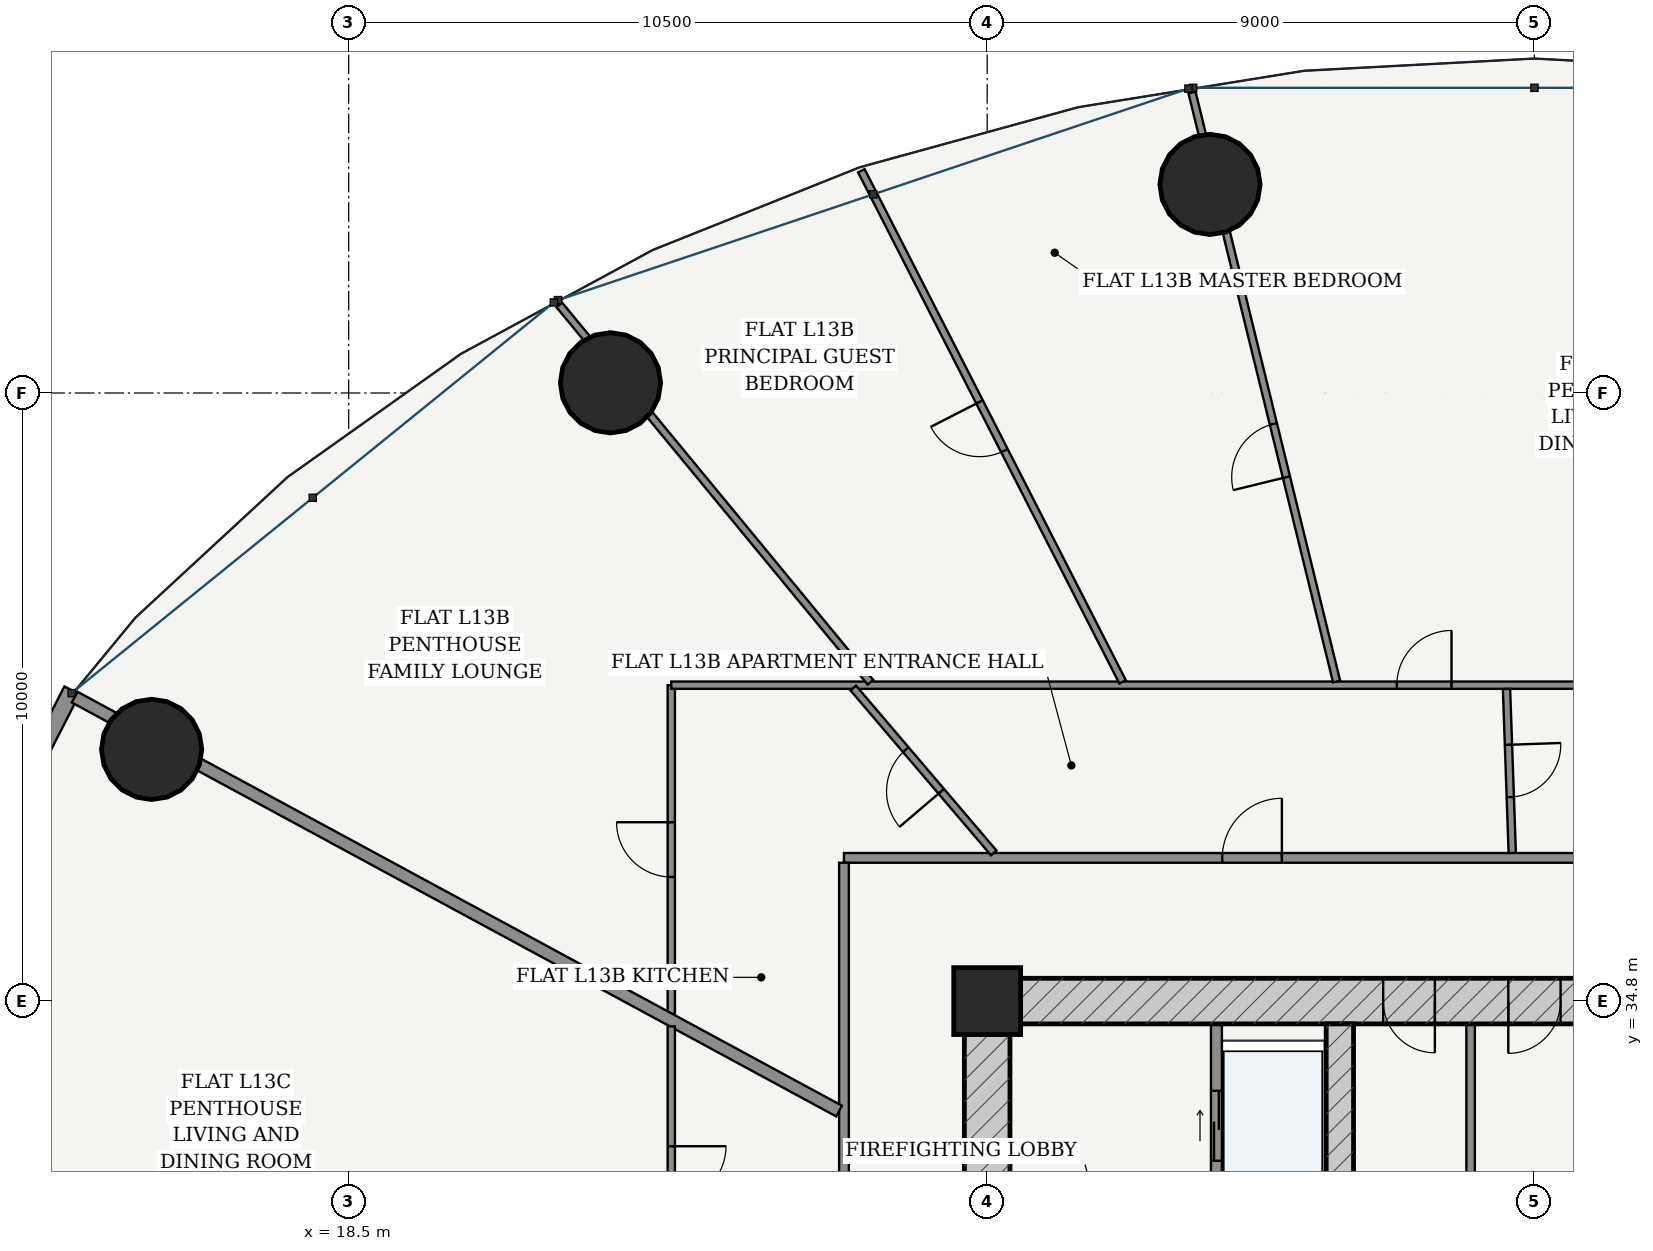
"""IFC4 building model, lengths in metres.
Left out: names, types, materials, properties, quantities, classifications, styles, units other than length and angle.
Written with IfcOpenShell. Run it as: python <this file> out.ifc"""

import sys

from ifc_helpers import new_model, si_unit, direction, frame, frame_2d, origin, origin_2d, place, context, subcontext, project, spatial, rectangle, hollow_circle, extrude, source, transform, mapped, element, fill, save


model = new_model("IFC4")
c1 = context("Model", 3, precision=1e-05, world=origin(), true_north=direction((-0.2419218956, 0.970295726276)))
c2 = subcontext(c1, "Body", "Model", "MODEL_VIEW")
j1 = project(units=[si_unit("LENGTHUNIT", "METRE"), si_unit("PLANEANGLEUNIT", "RADIAN")], contexts=[c1])
p1 = place(None, origin())
s1 = spatial("IfcSite", under=j1, at=p1, CompositionType="ELEMENT")
p2 = place(p1, origin())
s2 = spatial("IfcBuilding", under=s1, at=p2, CompositionType="ELEMENT")
p3 = place(p2, frame((0.0, 0.0, 52.8)))
s3 = spatial("IfcBuildingStorey", under=s2, at=p3, CompositionType="ELEMENT", Elevation=52.8)
p4 = place(p3, frame((29.0, 34.8, 0.0), z_axis=(0.0, 0.0, 1.0), x_axis=(1.0, 0.0, 0.0)))
e1 = element("IfcColumn", 1, at=p4, inside=s3, PredefinedType="COLUMN", context=c2, shape_type="SweptSolid", body=[
    extrude(rectangle(XDim=1.1, YDim=1.1, at=origin_2d()), origin(), (0.0, 0.0, 1.0), 3.6),
])
p5 = place(p3, frame((28.625, 34.8, 0.0), z_axis=(0.0, 0.0, 1.0), x_axis=(1.0, 0.0, 0.0)))
e2 = element("IfcWall", 2, at=p5, inside=s3, PredefinedType="SHEAR", context=c2, shape_type="SweptSolid", body=[
    extrude(rectangle(XDim=18.75, YDim=0.75, at=frame_2d((9.375, 0.0))), origin(), (0.0, 0.0, 1.0), 3.32),
])
p6 = place(p5, frame((6.887, 0.0, 0.0)))
e3 = element("IfcOpeningElement", 3, at=p6, cuts=e2, PredefinedType="OPENING", context=c2, shape_type="SweptSolid", body=[
    extrude(rectangle(XDim=0.85, YDim=2.1, at=frame_2d((0.425, 1.05))), frame((0.0, 0.385, 0.0), z_axis=(0.0, -1.0, 0.0), x_axis=(1.0, 0.0, 0.0)), (0.0, 0.0, 1.0), 0.77),
])
p7 = place(p5, frame((8.945, 0.0, 0.0)))
e4 = element("IfcOpeningElement", 4, at=p7, cuts=e2, PredefinedType="OPENING", context=c2, shape_type="SweptSolid", body=[
    extrude(rectangle(XDim=0.86, YDim=2.1, at=frame_2d((0.43, 1.05))), frame((0.0, 0.385, 0.0), z_axis=(0.0, -1.0, 0.0), x_axis=(1.0, 0.0, 0.0)), (0.0, 0.0, 1.0), 0.77),
])
p8 = place(p5, frame((11.012, 0.0, 0.0)))
e5 = element("IfcOpeningElement", 5, at=p8, cuts=e2, PredefinedType="OPENING", context=c2, shape_type="SweptSolid", body=[
    extrude(rectangle(XDim=0.85, YDim=2.1, at=frame_2d((0.425, 1.05))), frame((0.0, 0.385, 0.0), z_axis=(0.0, -1.0, 0.0), x_axis=(1.0, 0.0, 0.0)), (0.0, 0.0, 1.0), 0.77),
])
p9 = place(p3, frame((29.0, 19.175, 0.0), z_axis=(0.0, 0.0, 1.0), x_axis=(0.0, 1.0, 0.0)))
e6 = element("IfcWall", 6, at=p9, inside=s3, PredefinedType="SHEAR", context=c2, shape_type="SweptSolid", body=[
    extrude(rectangle(XDim=15.25, YDim=0.75, at=frame_2d((7.625, 0.0))), origin(), (0.0, 0.0, 1.0), 3.32),
])
p10 = place(p9, frame((9.875, 0.0, 0.0)))
e7 = element("IfcOpeningElement", 7, at=p10, cuts=e6, PredefinedType="OPENING", context=c2, shape_type="SweptSolid", body=[
    extrude(rectangle(XDim=1.5, YDim=2.2, at=frame_2d((0.75, 1.1))), frame((0.0, 0.385, 0.0), z_axis=(0.0, -1.0, 0.0), x_axis=(1.0, 0.0, 0.0)), (0.0, 0.0, 1.0), 0.77),
])
p11 = place(p3, frame((34.8, 19.175, 0.0), z_axis=(0.0, 0.0, 1.0), x_axis=(0.0, 1.0, 0.0)))
e8 = element("IfcWall", 8, at=p11, inside=s3, PredefinedType="SHEAR", context=c2, shape_type="SweptSolid", body=[
    extrude(rectangle(XDim=15.25, YDim=0.45, at=frame_2d((7.625, 0.0))), origin(), (0.0, 0.0, 1.0), 3.32),
])
p12 = place(p11, frame((7.8, 0.0, 0.0)))
e9 = element("IfcOpeningElement", 9, at=p12, cuts=e8, PredefinedType="OPENING", context=c2, shape_type="SweptSolid", body=[
    extrude(rectangle(XDim=1.05, YDim=2.15, at=frame_2d((0.525, 1.075))), frame((0.0, 0.235, 0.0), z_axis=(0.0, -1.0, 0.0), x_axis=(1.0, 0.0, 0.0)), (0.0, 0.0, 1.0), 0.47),
])
for number, where, z_axis, x_axis in (
    (10, (32.664, 48.23, 0.0), (0.0, 0.0, 1.0), (1.0, 0.0, 0.0)),
    (11, (22.805, 44.968, 0.0), (0.0, 0.0, 1.0), (1.0, 0.0, 0.0)),
    (12, (15.259, 38.939, 0.0), (0.0, 0.0, 1.0), (1.0, 0.0, 0.0)),
):
    element("IfcColumn", number, at=place(p3, frame(where, z_axis=z_axis, x_axis=x_axis)), inside=s3, PredefinedType="COLUMN", context=c2, shape_type="SweptSolid", body=[
        extrude(hollow_circle(Radius=0.825, WallThickness=0.05, at=origin_2d()), origin(), (0.0, 0.0, 1.0), 3.6),
    ])
p13 = place(p3, frame((13.949, 39.91, 0.0), z_axis=(0.0, 0.0, 1.0), x_axis=(-0.45523081716, -0.890373462715, 0.0)))
e13 = element("IfcWall", 13, at=p13, inside=s3, PredefinedType="SOLIDWALL", context=c2, shape_type="SweptSolid", body=[
    extrude(rectangle(XDim=9.662, YDim=0.28, at=frame_2d((4.831, 0.0))), origin(), (0.0, 0.0, 1.0), 3.32),
])
p14 = place(p13, frame((1.559, 0.0, 0.85)))
e14 = element("IfcOpeningElement", 14, at=p14, cuts=e13, PredefinedType="OPENING", context=c2, shape_type="SweptSolid", body=[
    extrude(rectangle(XDim=2.1, YDim=1.95, at=frame_2d((1.05, 0.975))), frame((0.0, 0.15, 0.0), z_axis=(0.0, -1.0, 0.0), x_axis=(1.0, 0.0, 0.0)), (0.0, 0.0, 1.0), 0.3),
])
p15 = place(p13, frame((6.003, 0.0, 0.85)))
e15 = element("IfcOpeningElement", 15, at=p15, cuts=e13, PredefinedType="OPENING", context=c2, shape_type="SweptSolid", body=[
    extrude(rectangle(XDim=2.1, YDim=1.95, at=frame_2d((1.05, 0.975))), frame((0.0, 0.15, 0.0), z_axis=(0.0, -1.0, 0.0), x_axis=(1.0, 0.0, 0.0)), (0.0, 0.0, 1.0), 0.3),
])
p16 = place(p3, frame((32.77, 28.52, 0.0), z_axis=(0.0, 0.0, 1.0), x_axis=(0.0, 1.0, 0.0)))
e16 = element("IfcWall", 16, at=p16, inside=s3, PredefinedType="PARTITIONING", context=c2, shape_type="SweptSolid", body=[
    extrude(rectangle(XDim=5.905, YDim=0.18, at=frame_2d((2.953, 0.0))), origin(), (0.0, 0.0, 1.0), 3.32),
])
p17 = place(p16, frame((3.655, 0.0, 0.0)))
e17 = element("IfcOpeningElement", 17, at=p17, cuts=e16, PredefinedType="OPENING", context=c2, shape_type="SweptSolid", body=[
    extrude(rectangle(XDim=1.15, YDim=2.2, at=frame_2d((0.575, 1.1))), frame((0.0, 0.1, 0.0), z_axis=(0.0, -1.0, 0.0), x_axis=(1.0, 0.0, 0.0)), (0.0, 0.0, 1.0), 0.2),
])
p18 = place(p16, frame((0.73, 0.0, 0.0)))
e18 = element("IfcOpeningElement", 18, at=p18, cuts=e16, PredefinedType="OPENING", context=c2, shape_type="SweptSolid", body=[
    extrude(rectangle(XDim=1.2, YDim=2.25, at=frame_2d((0.6, 1.125))), frame((0.0, 0.1, 0.0), z_axis=(0.0, -1.0, 0.0), x_axis=(1.0, 0.0, 0.0)), (0.0, 0.0, 1.0), 0.2),
])
p19 = place(p3, frame((36.95, 31.2, 0.0), z_axis=(0.0, 0.0, 1.0), x_axis=(0.0, 1.0, 0.0)))
e19 = element("IfcWall", 19, at=p19, inside=s3, PredefinedType="PARTITIONING", context=c2, shape_type="SweptSolid", body=[
    extrude(rectangle(XDim=3.225, YDim=0.14, at=frame_2d((1.613, 0.0))), origin(), (0.0, 0.0, 1.0), 3.32),
])
p20 = place(p3, frame((26.645, 37.155, 0.0), z_axis=(0.0, 0.0, 1.0), x_axis=(1.0, 0.0, 0.0)))
e20 = element("IfcWall", 20, at=p20, inside=s3, PredefinedType="PARTITIONING", context=c2, shape_type="SweptSolid", body=[
    extrude(rectangle(XDim=22.71, YDim=0.16, at=frame_2d((11.355, 0.0))), origin(), (0.0, 0.0, 1.0), 2.688),
])
p21 = place(p20, frame((19.075, 0.0, 0.0)))
e21 = element("IfcOpeningElement", 21, at=p21, cuts=e20, PredefinedType="OPENING", context=c2, shape_type="SweptSolid", body=[
    extrude(rectangle(XDim=0.98, YDim=2.2, at=frame_2d((0.49, 1.1))), frame((0.0, 0.09, 0.0), z_axis=(0.0, -1.0, 0.0), x_axis=(1.0, 0.0, 0.0)), (0.0, 0.0, 1.0), 0.18),
])
p22 = place(p20, frame((6.221, 0.0, 0.0)))
e22 = element("IfcOpeningElement", 22, at=p22, cuts=e20, PredefinedType="OPENING", context=c2, shape_type="SweptSolid", body=[
    extrude(rectangle(XDim=0.98, YDim=2.2, at=frame_2d((0.49, 1.1))), frame((0.0, 0.09, 0.0), z_axis=(0.0, -1.0, 0.0), x_axis=(1.0, 0.0, 0.0)), (0.0, 0.0, 1.0), 0.18),
])
p23 = place(p3, frame((26.645, 16.525, 0.0), z_axis=(0.0, 0.0, 1.0), x_axis=(0.0, 1.0, 0.0)))
e23 = element("IfcWall", 23, at=p23, inside=s3, PredefinedType="PARTITIONING", context=c2, shape_type="SweptSolid", body=[
    extrude(rectangle(XDim=20.55, YDim=0.16, at=frame_2d((10.275, 0.0))), origin(), (0.0, 0.0, 1.0), 2.688),
])
p24 = place(p23, frame((2.224, 0.0, 0.0)))
e24 = element("IfcOpeningElement", 24, at=p24, cuts=e23, PredefinedType="OPENING", context=c2, shape_type="SweptSolid", body=[
    extrude(rectangle(XDim=0.98, YDim=2.2, at=frame_2d((0.49, 1.1))), frame((0.0, 0.09, 0.0), z_axis=(0.0, -1.0, 0.0), x_axis=(1.0, 0.0, 0.0)), (0.0, 0.0, 1.0), 0.18),
])
p25 = place(p3, frame((23.805, 34.588, 0.0), z_axis=(0.0, 0.0, 1.0), x_axis=(0.0, 1.0, 0.0)))
e25 = element("IfcWall", 25, at=p25, inside=s3, PredefinedType="PARTITIONING", context=c2, shape_type="SweptSolid", body=[
    extrude(rectangle(XDim=5.407, YDim=0.12, at=frame_2d((2.704, 0.0))), origin(), (0.0, 0.0, 1.0), 2.999),
])
p26 = place(p25, frame((2.253, 0.0, 0.0)))
e26 = element("IfcOpeningElement", 26, at=p26, cuts=e25, PredefinedType="OPENING", context=c2, shape_type="SweptSolid", body=[
    extrude(rectangle(XDim=0.9, YDim=2.15, at=frame_2d((0.45, 1.075))), frame((0.0, 0.07, 0.0), z_axis=(0.0, -1.0, 0.0), x_axis=(1.0, 0.0, 0.0)), (0.0, 0.0, 1.0), 0.14),
])
p27 = place(p3, frame((23.805, 39.995, 0.0), z_axis=(0.0, 0.0, 1.0), x_axis=(1.0, 0.0, 0.0)))
e27 = element("IfcWall", 27, at=p27, inside=s3, PredefinedType="PARTITIONING", context=c2, shape_type="SweptSolid", body=[
    extrude(rectangle(XDim=20.838, YDim=0.12, at=frame_2d((10.419, 0.0))), origin(), (0.0, 0.0, 1.0), 2.688),
])
p28 = place(p27, frame((11.931, 0.0, 0.0)))
e28 = element("IfcOpeningElement", 28, at=p28, cuts=e27, PredefinedType="OPENING", context=c2, shape_type="SweptSolid", body=[
    extrude(rectangle(XDim=0.9, YDim=2.15, at=frame_2d((0.45, 1.075))), frame((0.0, 0.07, 0.0), z_axis=(0.0, -1.0, 0.0), x_axis=(1.0, 0.0, 0.0)), (0.0, 0.0, 1.0), 0.14),
])
p29 = place(p3, frame((34.746, 40.055, 0.0), z_axis=(0.0, 0.0, 1.0), x_axis=(-0.238386209483, 0.971170435675, 0.0)))
e29 = element("IfcWall", 29, at=p29, inside=s3, PredefinedType="PARTITIONING", context=c2, shape_type="SweptSolid", body=[
    extrude(rectangle(XDim=9.973, YDim=0.12, at=frame_2d((4.987, 0.0))), origin(), (0.0, 0.0, 1.0), 2.688),
])
p30 = place(p29, frame((3.461, 0.0, 0.0)))
e30 = element("IfcOpeningElement", 30, at=p30, cuts=e29, PredefinedType="OPENING", context=c2, shape_type="SweptSolid", body=[
    extrude(rectangle(XDim=0.9, YDim=2.15, at=frame_2d((0.45, 1.075))), frame((0.0, 0.07, 0.0), z_axis=(0.0, -1.0, 0.0), x_axis=(1.0, 0.0, 0.0)), (0.0, 0.0, 1.0), 0.14),
])
p31 = place(p3, frame((31.227, 40.05, 0.0), z_axis=(0.0, 0.0, 1.0), x_axis=(-0.455142050367, 0.890418841887, 0.0)))
e31 = element("IfcWall", 31, at=p31, inside=s3, PredefinedType="PARTITIONING", context=c2, shape_type="SweptSolid", body=[
    extrude(rectangle(XDim=9.438, YDim=0.12, at=frame_2d((4.719, 0.0))), origin(), (0.0, 0.0, 1.0), 2.762),
])
p32 = place(p31, frame((4.269, 0.0, 0.0)))
e32 = element("IfcOpeningElement", 32, at=p32, cuts=e31, PredefinedType="OPENING", context=c2, shape_type="SweptSolid", body=[
    extrude(rectangle(XDim=0.9, YDim=2.15, at=frame_2d((0.45, 1.075))), frame((0.0, 0.07, 0.0), z_axis=(0.0, -1.0, 0.0), x_axis=(1.0, 0.0, 0.0)), (0.0, 0.0, 1.0), 0.14),
])
p33 = place(p3, frame((27.081, 40.043, 0.0), z_axis=(0.0, 0.0, 1.0), x_axis=(-0.636193310573, 0.771529695852, 0.0)))
e33 = element("IfcWall", 33, at=p33, inside=s3, PredefinedType="PARTITIONING", context=c2, shape_type="SweptSolid", body=[
    extrude(rectangle(XDim=8.044, YDim=0.12, at=frame_2d((4.022, 0.0))), origin(), (0.0, 0.0, 1.0), 2.688),
])
p34 = place(p3, frame((37.635, 37.237, 0.0), z_axis=(0.0, 0.0, 1.0), x_axis=(-0.03493293564, 0.999389658746, 0.0)))
e34 = element("IfcWall", 34, at=p34, inside=s3, PredefinedType="PARTITIONING", context=c2, shape_type="SweptSolid", body=[
    extrude(rectangle(XDim=2.698, YDim=0.12, at=frame_2d((1.349, 0.0))), origin(), (0.0, 0.0, 1.0), 3.32),
])
p35 = place(p34, frame((0.919, 0.0, 0.0)))
e35 = element("IfcOpeningElement", 35, at=p35, cuts=e34, PredefinedType="OPENING", context=c2, shape_type="SweptSolid", body=[
    extrude(rectangle(XDim=0.86, YDim=2.15, at=frame_2d((0.43, 1.075))), frame((0.0, 0.07, 0.0), z_axis=(0.0, -1.0, 0.0), x_axis=(1.0, 0.0, 0.0)), (0.0, 0.0, 1.0), 0.14),
])
p36 = place(p3, frame((29.108, 37.237, 0.0), z_axis=(0.0, 0.0, 1.0), x_axis=(-0.648553247009, 0.761169288526, 0.0)))
e36 = element("IfcWall", 36, at=p36, inside=s3, PredefinedType="PARTITIONING", context=c2, shape_type="SweptSolid", body=[
    extrude(rectangle(XDim=3.562, YDim=0.12, at=frame_2d((1.781, 0.0))), origin(), (0.0, 0.0, 1.0), 2.999),
])
p37 = place(p36, frame((1.331, 0.0, 0.0)))
e37 = element("IfcOpeningElement", 37, at=p37, cuts=e36, PredefinedType="OPENING", context=c2, shape_type="SweptSolid", body=[
    extrude(rectangle(XDim=0.9, YDim=2.15, at=frame_2d((0.45, 1.075))), frame((0.0, 0.07, 0.0), z_axis=(0.0, -1.0, 0.0), x_axis=(1.0, 0.0, 0.0)), (0.0, 0.0, 1.0), 0.14),
])
p38 = place(p3, frame((26.565, 32.991, 0.0), z_axis=(0.0, 0.0, 1.0), x_axis=(-0.879369737803, 0.476139542819, 0.0)))
e38 = element("IfcWall", 38, at=p38, inside=s3, PredefinedType="PARTITIONING", context=c2, shape_type="SweptSolid", body=[
    extrude(rectangle(XDim=14.295, YDim=0.2, at=frame_2d((7.147, 0.0))), origin(), (0.0, 0.0, 1.0), 2.688),
])
p39 = place(p3, frame((23.805, 13.605, 0.0), z_axis=(0.0, 0.0, 1.0), x_axis=(0.0, 1.0, 0.0)))
e39 = element("IfcWall", 39, at=p39, inside=s3, PredefinedType="PARTITIONING", context=c2, shape_type="SweptSolid", body=[
    extrude(rectangle(XDim=20.779, YDim=0.12, at=frame_2d((10.39, 0.0))), origin(), (0.0, 0.0, 1.0), 2.688),
])
p40 = place(p39, frame((2.425, 0.0, 0.0)))
e40 = element("IfcOpeningElement", 40, at=p40, cuts=e39, PredefinedType="OPENING", context=c2, shape_type="SweptSolid", body=[
    extrude(rectangle(XDim=0.9, YDim=2.15, at=frame_2d((0.45, 1.075))), frame((0.0, 0.07, 0.0), z_axis=(0.0, -1.0, 0.0), x_axis=(1.0, 0.0, 0.0)), (0.0, 0.0, 1.0), 0.14),
])
p41 = place(p39, frame((14.199, 0.0, 0.0)))
e41 = element("IfcOpeningElement", 41, at=p41, cuts=e39, PredefinedType="OPENING", context=c2, shape_type="SweptSolid", body=[
    extrude(rectangle(XDim=0.9, YDim=2.15, at=frame_2d((0.45, 1.075))), frame((0.0, 0.07, 0.0), z_axis=(0.0, -1.0, 0.0), x_axis=(1.0, 0.0, 0.0)), (0.0, 0.0, 1.0), 0.14),
])
p42 = place(p39, frame((17.908, 0.0, 0.0)))
e42 = element("IfcOpeningElement", 42, at=p42, cuts=e39, PredefinedType="OPENING", context=c2, shape_type="SweptSolid", body=[
    extrude(rectangle(XDim=0.9, YDim=2.15, at=frame_2d((0.45, 1.075))), frame((0.0, 0.07, 0.0), z_axis=(0.0, -1.0, 0.0), x_axis=(1.0, 0.0, 0.0)), (0.0, 0.0, 1.0), 0.14),
])
m1 = source(origin(), c2, "Body", "SweptSolid", [
    extrude(rectangle(XDim=0.85, YDim=2.1, at=frame_2d((0.425, 1.05))), frame((0.0, 0.025, 0.0), z_axis=(0.0, -1.0, 0.0), x_axis=(1.0, 0.0, 0.0)), (0.0, 0.0, 1.0), 0.05),
])
p43 = place(p6, frame((0.85, 0.0, 0.0), z_axis=(0.0, 0.0, 1.0), x_axis=(-1.0, 0.0, 0.0)))
e43 = element("IfcDoor", 43, at=p43, inside=s3, OperationType="SINGLE_SWING_LEFT", PredefinedType="DOOR", context=c2, shape_type="MappedRepresentation", body=[
    mapped(m1, transform((0.0, 0.0, 0.0), scale=1.0)),
])
fill(e3, e43)
m2 = source(origin(), c2, "Body", "SweptSolid", [
    extrude(rectangle(XDim=0.86, YDim=2.1, at=frame_2d((0.43, 1.05))), frame((0.0, 0.025, 0.0), z_axis=(0.0, -1.0, 0.0), x_axis=(1.0, 0.0, 0.0)), (0.0, 0.0, 1.0), 0.05),
])
p44 = place(p7, frame((0.86, 0.0, 0.0), z_axis=(0.0, 0.0, 1.0), x_axis=(-1.0, 0.0, 0.0)))
e44 = element("IfcDoor", 44, at=p44, inside=s3, OperationType="SINGLE_SWING_RIGHT", PredefinedType="DOOR", context=c2, shape_type="MappedRepresentation", body=[
    mapped(m2, transform((0.0, 0.0, 0.0), scale=1.0)),
])
fill(e4, e44)
m3 = source(origin(), c2, "Body", "SweptSolid", [
    extrude(rectangle(XDim=1.15, YDim=2.2, at=frame_2d((0.575, 1.1))), frame((0.0, 0.025, 0.0), z_axis=(0.0, -1.0, 0.0), x_axis=(1.0, 0.0, 0.0)), (0.0, 0.0, 1.0), 0.05),
])
p45 = place(p17, origin())
e45 = element("IfcDoor", 45, at=p45, inside=s3, OperationType="DOUBLE_DOOR_SLIDING", PredefinedType="DOOR", context=c2, shape_type="MappedRepresentation", body=[
    mapped(m3, transform((0.0, 0.0, 0.0), scale=1.0)),
])
fill(e17, e45)
m4 = source(origin(), c2, "Body", "SweptSolid", [
    extrude(rectangle(XDim=0.98, YDim=2.2, at=frame_2d((0.49, 1.1))), frame((0.0, 0.025, 0.0), z_axis=(0.0, -1.0, 0.0), x_axis=(1.0, 0.0, 0.0)), (0.0, 0.0, 1.0), 0.05),
])
p46 = place(p22, origin())
e46 = element("IfcDoor", 46, at=p46, inside=s3, OperationType="SINGLE_SWING_RIGHT", PredefinedType="DOOR", context=c2, shape_type="MappedRepresentation", body=[
    mapped(m4, transform((0.0, 0.0, 0.0), scale=1.0)),
])
fill(e22, e46)
m5 = source(origin(), c2, "Body", "SweptSolid", [
    extrude(rectangle(XDim=0.86, YDim=2.15, at=frame_2d((0.43, 1.075))), frame((0.0, 0.025, 0.0), z_axis=(0.0, -1.0, 0.0), x_axis=(1.0, 0.0, 0.0)), (0.0, 0.0, 1.0), 0.05),
])
p47 = place(p35, frame((0.86, 0.0, 0.0), z_axis=(0.0, 0.0, 1.0), x_axis=(-1.0, 0.0, 0.0)))
e47 = element("IfcDoor", 47, at=p47, inside=s3, OperationType="SINGLE_SWING_LEFT", PredefinedType="DOOR", context=c2, shape_type="MappedRepresentation", body=[
    mapped(m5, transform((0.0, 0.0, 0.0), scale=1.0)),
])
fill(e35, e47)
m6 = source(origin(), c2, "Body", "SweptSolid", [
    extrude(rectangle(XDim=0.9, YDim=2.15, at=frame_2d((0.45, 1.075))), frame((0.0, 0.025, 0.0), z_axis=(0.0, -1.0, 0.0), x_axis=(1.0, 0.0, 0.0)), (0.0, 0.0, 1.0), 0.05),
])
p48 = place(p28, origin())
e48 = element("IfcDoor", 48, at=p48, inside=s3, OperationType="SINGLE_SWING_RIGHT", PredefinedType="DOOR", context=c2, shape_type="MappedRepresentation", body=[
    mapped(m6, transform((0.0, 0.0, 0.0), scale=1.0)),
])
fill(e28, e48)
p49 = place(p37, origin())
e49 = element("IfcDoor", 49, at=p49, inside=s3, OperationType="SINGLE_SWING_LEFT", PredefinedType="DOOR", context=c2, shape_type="MappedRepresentation", body=[
    mapped(m6, transform((0.0, 0.0, 0.0), scale=1.0)),
])
fill(e37, e49)
p50 = place(p26, origin())
e50 = element("IfcDoor", 50, at=p50, inside=s3, OperationType="SINGLE_SWING_RIGHT", PredefinedType="DOOR", context=c2, shape_type="MappedRepresentation", body=[
    mapped(m6, transform((0.0, 0.0, 0.0), scale=1.0)),
])
fill(e26, e50)
p51 = place(p30, origin())
e51 = element("IfcDoor", 51, at=p51, inside=s3, OperationType="SINGLE_SWING_LEFT", PredefinedType="DOOR", context=c2, shape_type="MappedRepresentation", body=[
    mapped(m6, transform((0.0, 0.0, 0.0), scale=1.0)),
])
fill(e30, e51)
p52 = place(p32, origin())
e52 = element("IfcDoor", 52, at=p52, inside=s3, OperationType="SINGLE_SWING_RIGHT", PredefinedType="DOOR", context=c2, shape_type="MappedRepresentation", body=[
    mapped(m6, transform((0.0, 0.0, 0.0), scale=1.0)),
])
fill(e32, e52)
p53 = place(p42, frame((0.9, 0.0, 0.0), z_axis=(0.0, 0.0, 1.0), x_axis=(-1.0, 0.0, 0.0)))
e53 = element("IfcDoor", 53, at=p53, inside=s3, OperationType="SINGLE_SWING_LEFT", PredefinedType="DOOR", context=c2, shape_type="MappedRepresentation", body=[
    mapped(m6, transform((0.0, 0.0, 0.0), scale=1.0)),
])
fill(e42, e53)
save(model, sys.argv[1])
